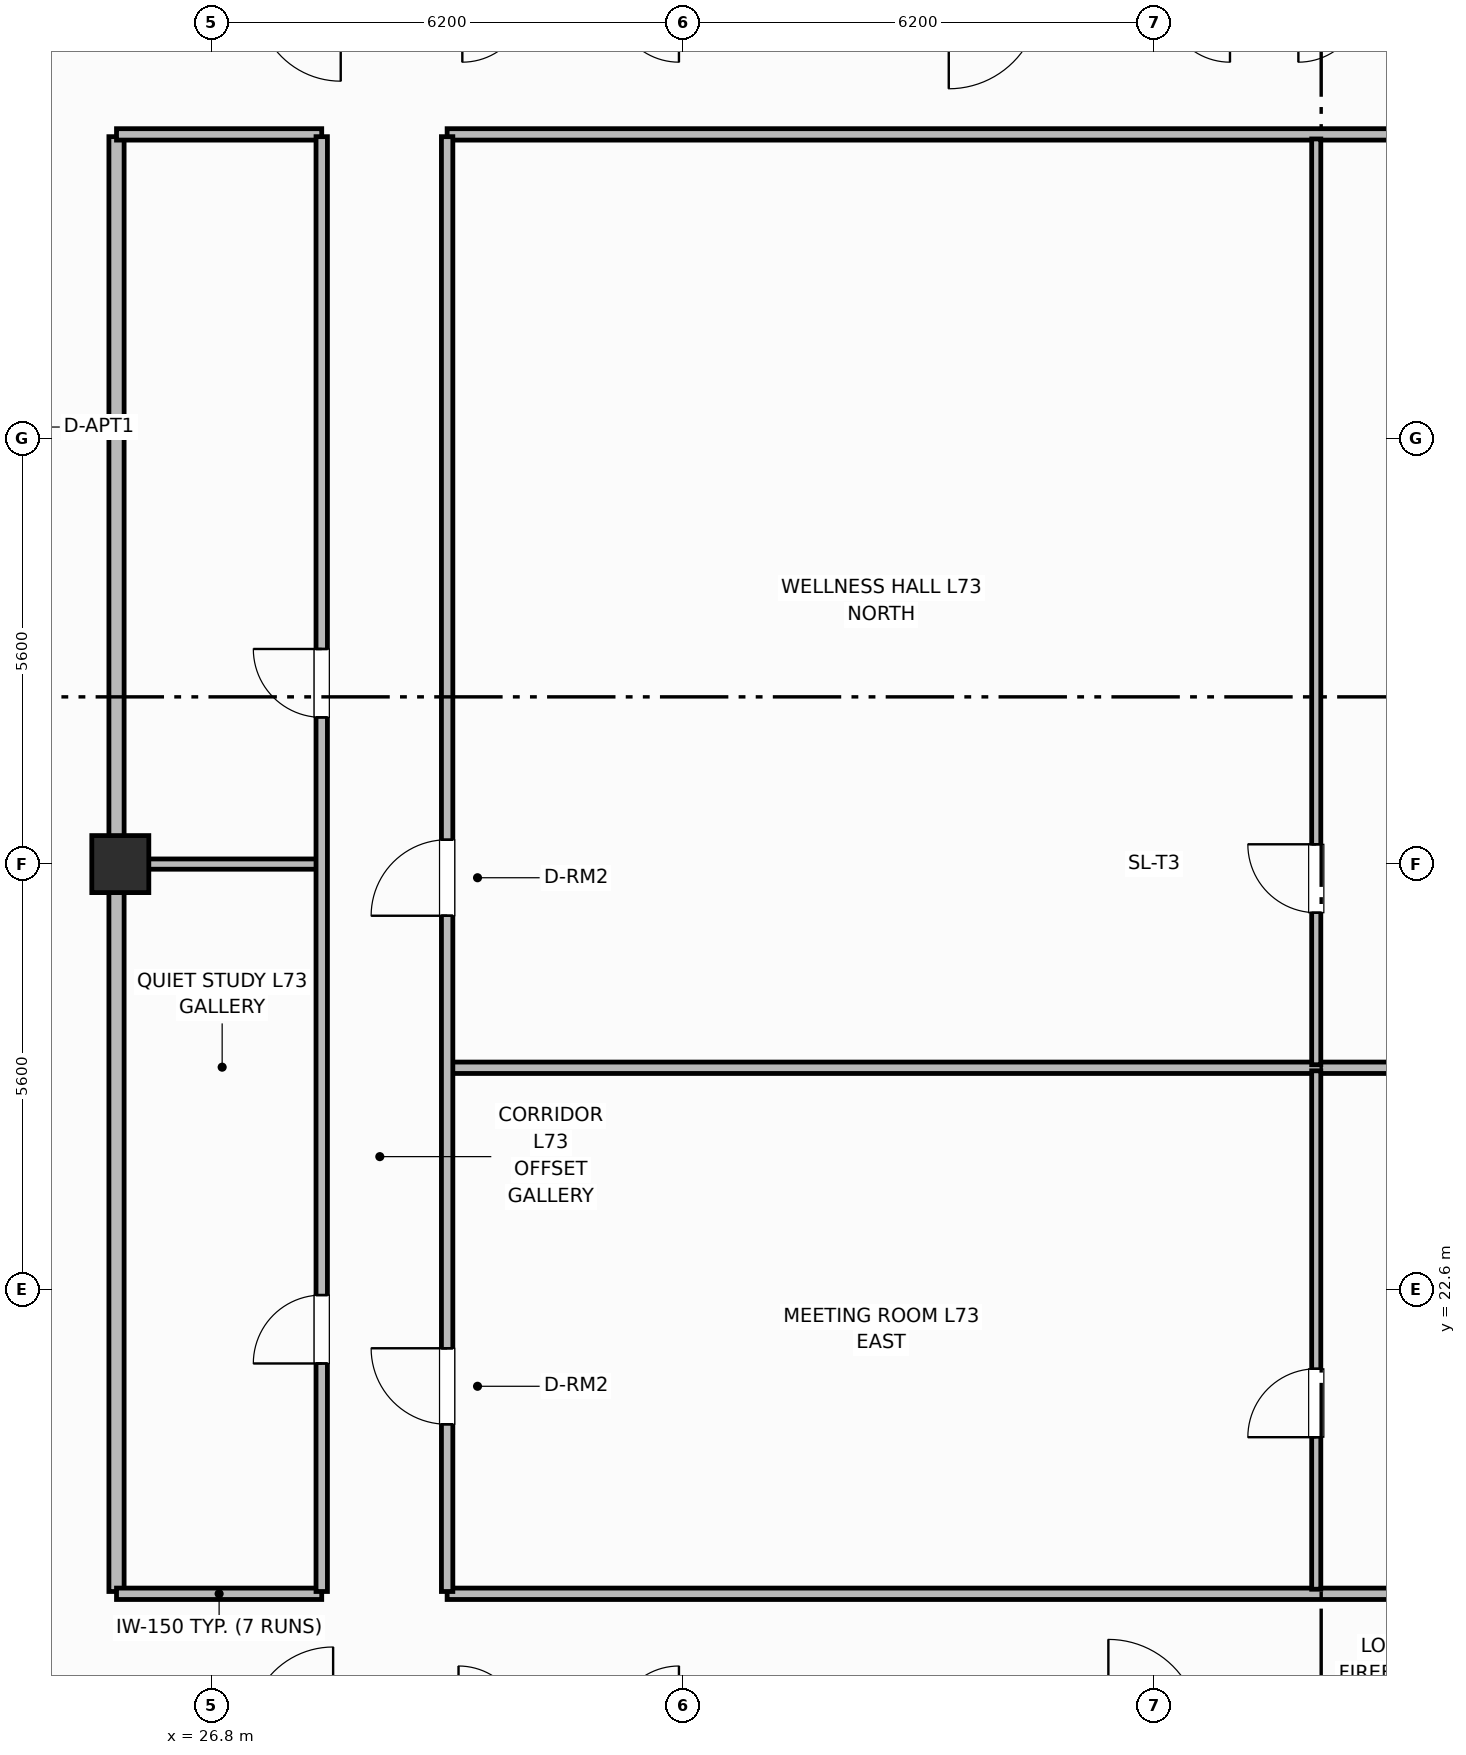
"""IFC4 building model, lengths in metres.
Left out: names, types, materials, properties, quantities, classifications, styles, units other than length and angle.
Written with IfcOpenShell. Run it as: python <this file> out.ifc"""

import sys

from ifc_helpers import new_model, si_unit, direction, frame, frame_2d, origin, origin_2d, place, context, subcontext, project, spatial, rectangle, extrude, element, fill, save


model = new_model("IFC4")
c1 = context("Model", 3, precision=1e-05, world=origin(), true_north=direction((0.0, 1.0)))
c2 = subcontext(c1, "Body", "Model", "MODEL_VIEW")
j1 = project(units=[si_unit("LENGTHUNIT", "METRE"), si_unit("PLANEANGLEUNIT", "RADIAN")], contexts=[c1])
p1 = place(None, origin())
s1 = spatial("IfcSite", under=j1, at=p1, CompositionType="ELEMENT")
p2 = place(p1, origin())
s2 = spatial("IfcBuilding", under=s1, at=p2, CompositionType="ELEMENT")
p3 = place(p2, frame((0.0, 0.0, 289.8)))
s3 = spatial("IfcBuildingStorey", under=s2, at=p3, CompositionType="ELEMENT", Elevation=289.8)
p4 = place(p3, frame((25.6, 28.2, 0.0), z_axis=(0.0, 0.0, 1.0), x_axis=(1.0, 0.0, 0.0)))
e1 = element("IfcColumn", 1, at=p4, inside=s3, PredefinedType="COLUMN", context=c2, shape_type="SweptSolid", body=[
    extrude(rectangle(XDim=0.75, YDim=0.75, at=origin_2d()), origin(), (0.0, 0.0, 1.0), 3.7),
])
p5 = place(p3, frame((25.55, 18.63, 0.0), z_axis=(0.0, 0.0, 1.0), x_axis=(0.0, 1.0, 0.0)))
e2 = element("IfcWall", 2, at=p5, inside=s3, PredefinedType="PARTITIONING", context=c2, shape_type="SweptSolid", body=[
    extrude(rectangle(XDim=19.14, YDim=0.2, at=frame_2d((9.57, 0.0))), origin(), (0.0, 0.0, 1.0), 2.56),
])
p6 = place(p3, frame((25.55, 18.6, 0.0), z_axis=(0.0, 0.0, 1.0), x_axis=(1.0, 0.0, 0.0)))
e3 = element("IfcWall", 3, at=p6, inside=s3, PredefinedType="PARTITIONING", context=c2, shape_type="SweptSolid", body=[
    extrude(rectangle(XDim=2.7, YDim=0.15, at=frame_2d((1.35, 0.0))), origin(), (0.0, 0.0, 1.0), 2.56),
])
p7 = place(p3, frame((29.9, 18.6, 0.0), z_axis=(0.0, 0.0, 1.0), x_axis=(1.0, 0.0, 0.0)))
e4 = element("IfcWall", 4, at=p7, inside=s3, PredefinedType="PARTITIONING", context=c2, shape_type="SweptSolid", body=[
    extrude(rectangle(XDim=22.95, YDim=0.15, at=frame_2d((11.475, 0.0))), origin(), (0.0, 0.0, 1.0), 2.56),
])
p8 = place(p3, frame((25.55, 37.8, 0.0), z_axis=(0.0, 0.0, 1.0), x_axis=(1.0, 0.0, 0.0)))
e5 = element("IfcWall", 5, at=p8, inside=s3, PredefinedType="PARTITIONING", context=c2, shape_type="SweptSolid", body=[
    extrude(rectangle(XDim=2.7, YDim=0.15, at=frame_2d((1.35, 0.0))), origin(), (0.0, 0.0, 1.0), 2.56),
])
p9 = place(p3, frame((29.9, 37.8, 0.0), z_axis=(0.0, 0.0, 1.0), x_axis=(1.0, 0.0, 0.0)))
e6 = element("IfcWall", 6, at=p9, inside=s3, PredefinedType="PARTITIONING", context=c2, shape_type="SweptSolid", body=[
    extrude(rectangle(XDim=22.95, YDim=0.15, at=frame_2d((11.475, 0.0))), origin(), (0.0, 0.0, 1.0), 2.56),
])
p10 = place(p3, frame((25.6, 28.2, 0.0), z_axis=(0.0, 0.0, 1.0), x_axis=(1.0, 0.0, 0.0)))
e7 = element("IfcWall", 7, at=p10, inside=s3, PredefinedType="PARTITIONING", context=c2, shape_type="SweptSolid", body=[
    extrude(rectangle(XDim=2.66, YDim=0.135, at=frame_2d((1.33, 0.0))), origin(), (0.0, 0.0, 1.0), 2.56),
])
p11 = place(p3, frame((29.93, 25.521, 0.0), z_axis=(0.0, 0.0, 1.0), x_axis=(1.0, 0.0, 0.0)))
e8 = element("IfcWall", 8, at=p11, inside=s3, PredefinedType="PARTITIONING", context=c2, shape_type="SweptSolid", body=[
    extrude(rectangle(XDim=22.87, YDim=0.15, at=frame_2d((11.435, 0.0))), origin(), (0.0, 0.0, 1.0), 2.56),
])
p12 = place(p3, frame((41.335, 18.66, 0.0), z_axis=(0.0, 0.0, 1.0), x_axis=(0.0, 1.0, 0.0)))
e9 = element("IfcWall", 9, at=p12, inside=s3, PredefinedType="PARTITIONING", context=c2, shape_type="SweptSolid", body=[
    extrude(rectangle(XDim=6.821, YDim=0.12, at=frame_2d((3.41, 0.0))), origin(), (0.0, 0.0, 1.0), 2.56),
])
p13 = place(p12, frame((2.0, 0.0, 0.0)))
e10 = element("IfcOpeningElement", 10, at=p13, cuts=e9, PredefinedType="OPENING", context=c2, shape_type="SweptSolid", body=[
    extrude(rectangle(XDim=0.9, YDim=2.1, at=frame_2d((0.45, 1.05))), frame((0.0, 0.07, 0.0), z_axis=(0.0, -1.0, 0.0), x_axis=(1.0, 0.0, 0.0)), (0.0, 0.0, 1.0), 0.14),
])
p14 = place(p3, frame((41.335, 25.56, 0.0), z_axis=(0.0, 0.0, 1.0), x_axis=(0.0, 1.0, 0.0)))
e11 = element("IfcWall", 11, at=p14, inside=s3, PredefinedType="PARTITIONING", context=c2, shape_type="SweptSolid", body=[
    extrude(rectangle(XDim=12.18, YDim=0.12, at=frame_2d((6.09, 0.0))), origin(), (0.0, 0.0, 1.0), 2.56),
])
p15 = place(p14, frame((2.0, 0.0, 0.0)))
e12 = element("IfcOpeningElement", 12, at=p15, cuts=e11, PredefinedType="OPENING", context=c2, shape_type="SweptSolid", body=[
    extrude(rectangle(XDim=0.9, YDim=2.1, at=frame_2d((0.45, 1.05))), frame((0.0, 0.07, 0.0), z_axis=(0.0, -1.0, 0.0), x_axis=(1.0, 0.0, 0.0)), (0.0, 0.0, 1.0), 0.14),
])
p16 = place(p3, frame((28.25, 18.63, 0.0), z_axis=(0.0, 0.0, 1.0), x_axis=(0.0, 1.0, 0.0)))
e13 = element("IfcWall", 13, at=p16, inside=s3, PredefinedType="PARTITIONING", context=c2, shape_type="SweptSolid", body=[
    extrude(rectangle(XDim=19.14, YDim=0.15, at=frame_2d((9.57, 0.0))), origin(), (0.0, 0.0, 1.0), 2.56),
])
p17 = place(p16, frame((3.0, 0.0, 0.0)))
e14 = element("IfcOpeningElement", 14, at=p17, cuts=e13, PredefinedType="OPENING", context=c2, shape_type="SweptSolid", body=[
    extrude(rectangle(XDim=0.9, YDim=2.1, at=frame_2d((0.45, 1.05))), frame((0.0, 0.085, 0.0), z_axis=(0.0, -1.0, 0.0), x_axis=(1.0, 0.0, 0.0)), (0.0, 0.0, 1.0), 0.17),
])
p18 = place(p16, frame((11.5, 0.0, 0.0)))
e15 = element("IfcOpeningElement", 15, at=p18, cuts=e13, PredefinedType="OPENING", context=c2, shape_type="SweptSolid", body=[
    extrude(rectangle(XDim=0.9, YDim=2.1, at=frame_2d((0.45, 1.05))), frame((0.0, 0.085, 0.0), z_axis=(0.0, -1.0, 0.0), x_axis=(1.0, 0.0, 0.0)), (0.0, 0.0, 1.0), 0.17),
])
p19 = place(p3, frame((29.9, 18.63, 0.0), z_axis=(0.0, 0.0, 1.0), x_axis=(0.0, 1.0, 0.0)))
e16 = element("IfcWall", 16, at=p19, inside=s3, PredefinedType="PARTITIONING", context=c2, shape_type="SweptSolid", body=[
    extrude(rectangle(XDim=19.14, YDim=0.15, at=frame_2d((9.57, 0.0))), origin(), (0.0, 0.0, 1.0), 2.56),
])
p20 = place(p19, frame((2.2, 0.0, 0.0)))
e17 = element("IfcOpeningElement", 17, at=p20, cuts=e16, PredefinedType="OPENING", context=c2, shape_type="SweptSolid", body=[
    extrude(rectangle(XDim=1.0, YDim=2.15, at=frame_2d((0.5, 1.075))), frame((0.0, 0.085, 0.0), z_axis=(0.0, -1.0, 0.0), x_axis=(1.0, 0.0, 0.0)), (0.0, 0.0, 1.0), 0.17),
])
p21 = place(p19, frame((8.89, 0.0, 0.0)))
e18 = element("IfcOpeningElement", 18, at=p21, cuts=e16, PredefinedType="OPENING", context=c2, shape_type="SweptSolid", body=[
    extrude(rectangle(XDim=1.0, YDim=2.15, at=frame_2d((0.5, 1.075))), frame((0.0, 0.085, 0.0), z_axis=(0.0, -1.0, 0.0), x_axis=(1.0, 0.0, 0.0)), (0.0, 0.0, 1.0), 0.17),
])
p22 = place(p13, origin())
e19 = element("IfcDoor", 19, at=p22, inside=s3, OperationType="SINGLE_SWING_LEFT", PredefinedType="DOOR", context=c2, shape_type="SweptSolid", body=[
    extrude(rectangle(XDim=0.9, YDim=2.1, at=frame_2d((0.45, 1.05))), frame((0.0, 0.025, 0.0), z_axis=(0.0, -1.0, 0.0), x_axis=(1.0, 0.0, 0.0)), (0.0, 0.0, 1.0), 0.05),
])
fill(e10, e19)
p23 = place(p15, origin())
e20 = element("IfcDoor", 20, at=p23, inside=s3, OperationType="SINGLE_SWING_RIGHT", PredefinedType="DOOR", context=c2, shape_type="SweptSolid", body=[
    extrude(rectangle(XDim=0.9, YDim=2.1, at=frame_2d((0.45, 1.05))), frame((0.0, 0.025, 0.0), z_axis=(0.0, -1.0, 0.0), x_axis=(1.0, 0.0, 0.0)), (0.0, 0.0, 1.0), 0.05),
])
fill(e12, e20)
p24 = place(p17, origin())
e21 = element("IfcDoor", 21, at=p24, inside=s3, OperationType="SINGLE_SWING_LEFT", PredefinedType="DOOR", context=c2, shape_type="SweptSolid", body=[
    extrude(rectangle(XDim=0.9, YDim=2.1, at=frame_2d((0.45, 1.05))), frame((0.0, 0.025, 0.0), z_axis=(0.0, -1.0, 0.0), x_axis=(1.0, 0.0, 0.0)), (0.0, 0.0, 1.0), 0.05),
])
fill(e14, e21)
p25 = place(p18, origin())
e22 = element("IfcDoor", 22, at=p25, inside=s3, OperationType="SINGLE_SWING_RIGHT", PredefinedType="DOOR", context=c2, shape_type="SweptSolid", body=[
    extrude(rectangle(XDim=0.9, YDim=2.1, at=frame_2d((0.45, 1.05))), frame((0.0, 0.025, 0.0), z_axis=(0.0, -1.0, 0.0), x_axis=(1.0, 0.0, 0.0)), (0.0, 0.0, 1.0), 0.05),
])
fill(e15, e22)
p26 = place(p20, origin())
e23 = element("IfcDoor", 23, at=p26, inside=s3, OperationType="SINGLE_SWING_RIGHT", PredefinedType="DOOR", context=c2, shape_type="SweptSolid", body=[
    extrude(rectangle(XDim=1.0, YDim=2.15, at=frame_2d((0.5, 1.075))), frame((0.0, 0.025, 0.0), z_axis=(0.0, -1.0, 0.0), x_axis=(1.0, 0.0, 0.0)), (0.0, 0.0, 1.0), 0.05),
])
fill(e17, e23)
p27 = place(p21, origin())
e24 = element("IfcDoor", 24, at=p27, inside=s3, OperationType="SINGLE_SWING_LEFT", PredefinedType="DOOR", context=c2, shape_type="SweptSolid", body=[
    extrude(rectangle(XDim=1.0, YDim=2.15, at=frame_2d((0.5, 1.075))), frame((0.0, 0.025, 0.0), z_axis=(0.0, -1.0, 0.0), x_axis=(1.0, 0.0, 0.0)), (0.0, 0.0, 1.0), 0.05),
])
fill(e18, e24)
save(model, sys.argv[1])
